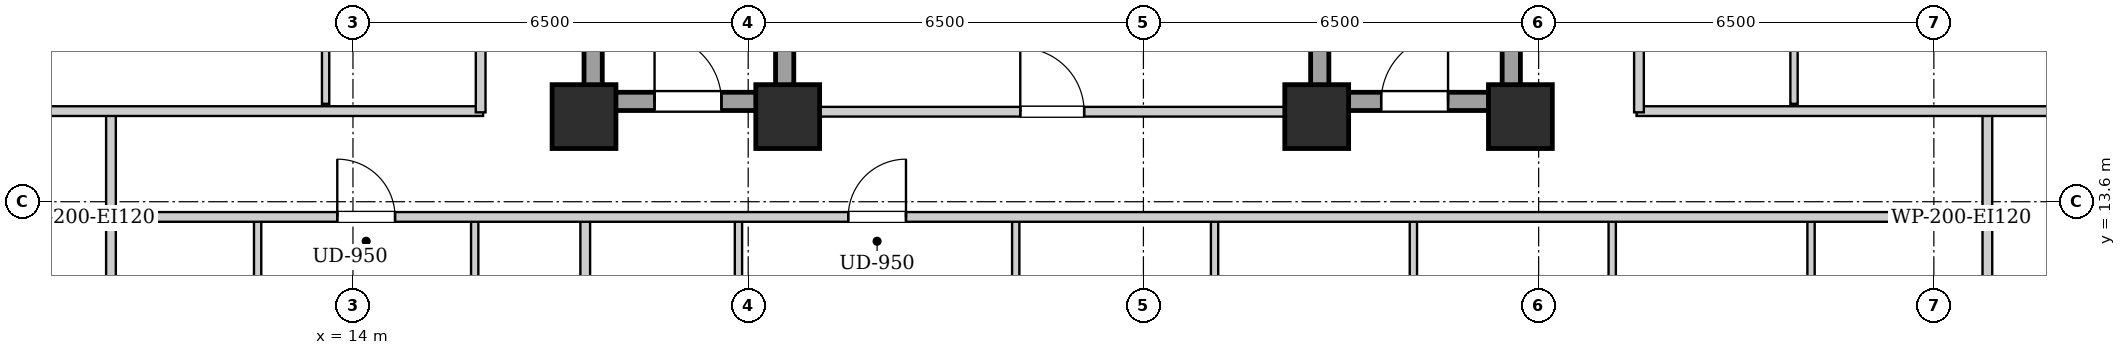
"""IFC4 building model, lengths in metres.
Left out: names, types, materials, properties, quantities, classifications, styles, units other than length and angle.
Written with IfcOpenShell. Run it as: python <this file> out.ifc"""

import sys

from ifc_helpers import new_model, si_unit, direction, frame, frame_2d, origin, origin_2d, place, context, subcontext, project, spatial, rectangle, extrude, element, fill, save


model = new_model("IFC4")
c1 = context("Model", 3, precision=1e-05, world=origin(), true_north=direction((0.0, 1.0)))
c2 = subcontext(c1, "Body", "Model", "MODEL_VIEW")
j1 = project(units=[si_unit("LENGTHUNIT", "METRE"), si_unit("PLANEANGLEUNIT", "RADIAN")], contexts=[c1])
p1 = place(None, origin())
s1 = spatial("IfcSite", under=j1, at=p1, CompositionType="ELEMENT")
p2 = place(p1, origin())
s2 = spatial("IfcBuilding", under=s1, at=p2, CompositionType="ELEMENT")
p3 = place(p2, frame((0.0, 0.0, 116.7)))
s3 = spatial("IfcBuildingStorey", under=s2, at=p3, CompositionType="ELEMENT", Elevation=116.7)
for number, where, z_axis, x_axis in (
    (1, (17.8, 15.0, 0.0), (0.0, 0.0, 1.0), (1.0, 0.0, 0.0)),
    (2, (21.15, 15.0, 0.0), (0.0, 0.0, 1.0), (1.0, 0.0, 0.0)),
    (3, (29.85, 15.0, 0.0), (0.0, 0.0, 1.0), (1.0, 0.0, 0.0)),
    (4, (33.2, 15.0, 0.0), (0.0, 0.0, 1.0), (1.0, 0.0, 0.0)),
):
    element("IfcColumn", number, at=place(p3, frame(where, z_axis=z_axis, x_axis=x_axis)), inside=s3, PredefinedType="COLUMN", context=c2, shape_type="SweptSolid", body=[
        extrude(rectangle(XDim=1.05, YDim=1.05, at=origin_2d()), origin(), (0.0, 0.0, 1.0), 3.2),
    ])
for number, where, z_axis, x_axis in (
    (5, (17.95, 15.1, 0.0), (0.0, 0.0, 1.0), (0.0, 1.0, 0.0)),
    (6, (21.1, 15.1, 0.0), (0.0, 0.0, 1.0), (0.0, 1.0, 0.0)),
):
    element("IfcWall", number, at=place(p3, frame(where, z_axis=z_axis, x_axis=x_axis)), inside=s3, PredefinedType="SHEAR", context=c2, shape_type="SweptSolid", body=[
        extrude(rectangle(XDim=9.0, YDim=0.3, at=frame_2d((4.5, 0.0))), origin(), (0.0, 0.0, 1.0), 2.88),
    ])
p4 = place(p3, frame((18.1, 15.25, 0.0), z_axis=(0.0, 0.0, 1.0), x_axis=(1.0, 0.0, 0.0)))
e7 = element("IfcWall", 7, at=p4, inside=s3, PredefinedType="SHEAR", context=c2, shape_type="SweptSolid", body=[
    extrude(rectangle(XDim=2.85, YDim=0.3, at=frame_2d((1.425, 0.0))), origin(), (0.0, 0.0, 1.0), 2.88),
])
p5 = place(p4, frame((0.86, 0.0, 0.0)))
e8 = element("IfcOpeningElement", 8, at=p5, cuts=e7, PredefinedType="OPENING", context=c2, shape_type="SweptSolid", body=[
    extrude(rectangle(XDim=1.1, YDim=2.05, at=frame_2d((0.55, 1.025))), frame((0.0, 0.16, 0.0), z_axis=(0.0, -1.0, 0.0), x_axis=(1.0, 0.0, 0.0)), (0.0, 0.0, 1.0), 0.32),
])
for number, where, z_axis, x_axis in (
    (9, (29.9, 15.1, 0.0), (0.0, 0.0, 1.0), (0.0, 1.0, 0.0)),
    (10, (33.05, 15.1, 0.0), (0.0, 0.0, 1.0), (0.0, 1.0, 0.0)),
):
    element("IfcWall", number, at=place(p3, frame(where, z_axis=z_axis, x_axis=x_axis)), inside=s3, PredefinedType="SHEAR", context=c2, shape_type="SweptSolid", body=[
        extrude(rectangle(XDim=9.0, YDim=0.3, at=frame_2d((4.5, 0.0))), origin(), (0.0, 0.0, 1.0), 2.88),
    ])
p6 = place(p3, frame((30.05, 15.25, 0.0), z_axis=(0.0, 0.0, 1.0), x_axis=(1.0, 0.0, 0.0)))
e11 = element("IfcWall", 11, at=p6, inside=s3, PredefinedType="SHEAR", context=c2, shape_type="SweptSolid", body=[
    extrude(rectangle(XDim=2.85, YDim=0.3, at=frame_2d((1.425, 0.0))), origin(), (0.0, 0.0, 1.0), 2.88),
])
p7 = place(p6, frame((0.86, 0.0, 0.0)))
e12 = element("IfcOpeningElement", 12, at=p7, cuts=e11, PredefinedType="OPENING", context=c2, shape_type="SweptSolid", body=[
    extrude(rectangle(XDim=1.1, YDim=2.05, at=frame_2d((0.55, 1.025))), frame((0.0, 0.16, 0.0), z_axis=(0.0, -1.0, 0.0), x_axis=(1.0, 0.0, 0.0)), (0.0, 0.0, 1.0), 0.32),
])
p8 = place(p3, frame((21.25, 15.08, 0.0), z_axis=(0.0, 0.0, 1.0), x_axis=(1.0, 0.0, 0.0)))
e13 = element("IfcWall", 13, at=p8, inside=s3, PredefinedType="PARTITIONING", context=c2, shape_type="SweptSolid", body=[
    extrude(rectangle(XDim=8.5, YDim=0.16, at=frame_2d((4.25, 0.0))), origin(), (0.0, 0.0, 1.0), 2.253),
])
p9 = place(p8, frame((3.725, 0.0, 0.0)))
e14 = element("IfcOpeningElement", 14, at=p9, cuts=e13, PredefinedType="OPENING", context=c2, shape_type="SweptSolid", body=[
    extrude(rectangle(XDim=1.05, YDim=2.05, at=frame_2d((0.525, 1.025))), frame((0.0, 0.09, 0.0), z_axis=(0.0, -1.0, 0.0), x_axis=(1.0, 0.0, 0.0)), (0.0, 0.0, 1.0), 0.18),
])
for number, where, z_axis, x_axis in (
    (15, (10.02, 13.35, 0.0), (0.0, 0.0, 1.0), (0.0, 1.0, 0.0)),
    (16, (40.88, 13.35, 0.0), (0.0, 0.0, 1.0), (0.0, 1.0, 0.0)),
):
    element("IfcWall", number, at=place(p3, frame(where, z_axis=z_axis, x_axis=x_axis)), inside=s3, PredefinedType="PARTITIONING", context=c2, shape_type="SweptSolid", body=[
        extrude(rectangle(XDim=1.74, YDim=0.16, at=frame_2d((0.87, 0.0))), origin(), (0.0, 0.0, 1.0), 2.88),
    ])
p10 = place(p3, frame((7.78, 15.09, 0.0), z_axis=(0.0, 0.0, 1.0), x_axis=(1.0, 0.0, 0.0)))
e17 = element("IfcWall", 17, at=p10, inside=s3, PredefinedType="PARTITIONING", context=c2, shape_type="SweptSolid", body=[
    extrude(rectangle(XDim=8.36, YDim=0.16, at=frame_2d((4.18, 0.0))), origin(), (0.0, 0.0, 1.0), 2.253),
])
p11 = place(p3, frame((35.11, 15.09, 0.0), z_axis=(0.0, 0.0, 1.0), x_axis=(1.0, 0.0, 0.0)))
e18 = element("IfcWall", 18, at=p11, inside=s3, PredefinedType="PARTITIONING", context=c2, shape_type="SweptSolid", body=[
    extrude(rectangle(XDim=8.01, YDim=0.16, at=frame_2d((4.005, 0.0))), origin(), (0.0, 0.0, 1.0), 2.253),
])
p12 = place(p3, frame((10.02, 10.4, 0.0), z_axis=(0.0, 0.0, 1.0), x_axis=(0.0, 1.0, 0.0)))
e19 = element("IfcWall", 19, at=p12, inside=s3, PredefinedType="PARTITIONING", context=c2, shape_type="SweptSolid", body=[
    extrude(rectangle(XDim=2.91, YDim=0.16, at=frame_2d((1.455, 0.0))), origin(), (0.0, 0.0, 1.0), 2.88),
])
p13 = place(p3, frame((12.432, 10.46, 0.0), z_axis=(0.0, 0.0, 1.0), x_axis=(0.0, 1.0, 0.0)))
e20 = element("IfcWall", 20, at=p13, inside=s3, PredefinedType="PARTITIONING", context=c2, shape_type="SweptSolid", body=[
    extrude(rectangle(XDim=2.85, YDim=0.12, at=frame_2d((1.425, 0.0))), origin(), (0.0, 0.0, 1.0), 2.88),
])
p14 = place(p13, frame((0.995, 0.0, 0.0)))
e21 = element("IfcOpeningElement", 21, at=p14, cuts=e20, PredefinedType="OPENING", context=c2, shape_type="SweptSolid", body=[
    extrude(rectangle(XDim=0.86, YDim=2.05, at=frame_2d((0.43, 1.025))), frame((0.0, 0.07, 0.0), z_axis=(0.0, -1.0, 0.0), x_axis=(1.0, 0.0, 0.0)), (0.0, 0.0, 1.0), 0.14),
])
p15 = place(p3, frame((16.002, 10.46, 0.0), z_axis=(0.0, 0.0, 1.0), x_axis=(0.0, 1.0, 0.0)))
e22 = element("IfcWall", 22, at=p15, inside=s3, PredefinedType="PARTITIONING", context=c2, shape_type="SweptSolid", body=[
    extrude(rectangle(XDim=2.85, YDim=0.12, at=frame_2d((1.425, 0.0))), origin(), (0.0, 0.0, 1.0), 2.88),
])
p16 = place(p15, frame((0.975, 0.0, 0.0)))
e23 = element("IfcOpeningElement", 23, at=p16, cuts=e22, PredefinedType="OPENING", context=c2, shape_type="SweptSolid", body=[
    extrude(rectangle(XDim=0.9, YDim=2.05, at=frame_2d((0.45, 1.025))), frame((0.0, 0.07, 0.0), z_axis=(0.0, -1.0, 0.0), x_axis=(1.0, 0.0, 0.0)), (0.0, 0.0, 1.0), 0.14),
])
p17 = place(p3, frame((40.88, 10.4, 0.0), z_axis=(0.0, 0.0, 1.0), x_axis=(0.0, 1.0, 0.0)))
e24 = element("IfcWall", 24, at=p17, inside=s3, PredefinedType="PARTITIONING", context=c2, shape_type="SweptSolid", body=[
    extrude(rectangle(XDim=2.91, YDim=0.16, at=frame_2d((1.455, 0.0))), origin(), (0.0, 0.0, 1.0), 2.88),
])
p18 = place(p3, frame((17.82, 2.26, 0.0), z_axis=(0.0, 0.0, 1.0), x_axis=(0.0, 1.0, 0.0)))
e25 = element("IfcWall", 25, at=p18, inside=s3, PredefinedType="PARTITIONING", context=c2, shape_type="SweptSolid", body=[
    extrude(rectangle(XDim=11.05, YDim=0.16, at=frame_2d((5.525, 0.0))), origin(), (0.0, 0.0, 1.0), 2.253),
])
p19 = place(p3, frame((20.34, 10.46, 0.0), z_axis=(0.0, 0.0, 1.0), x_axis=(0.0, 1.0, 0.0)))
e26 = element("IfcWall", 26, at=p19, inside=s3, PredefinedType="PARTITIONING", context=c2, shape_type="SweptSolid", body=[
    extrude(rectangle(XDim=2.85, YDim=0.12, at=frame_2d((1.425, 0.0))), origin(), (0.0, 0.0, 1.0), 2.88),
])
p20 = place(p19, frame((0.995, 0.0, 0.0)))
e27 = element("IfcOpeningElement", 27, at=p20, cuts=e26, PredefinedType="OPENING", context=c2, shape_type="SweptSolid", body=[
    extrude(rectangle(XDim=0.86, YDim=2.05, at=frame_2d((0.43, 1.025))), frame((0.0, 0.07, 0.0), z_axis=(0.0, -1.0, 0.0), x_axis=(1.0, 0.0, 0.0)), (0.0, 0.0, 1.0), 0.14),
])
p21 = place(p3, frame((24.9, 10.46, 0.0), z_axis=(0.0, 0.0, 1.0), x_axis=(0.0, 1.0, 0.0)))
e28 = element("IfcWall", 28, at=p21, inside=s3, PredefinedType="PARTITIONING", context=c2, shape_type="SweptSolid", body=[
    extrude(rectangle(XDim=2.85, YDim=0.12, at=frame_2d((1.425, 0.0))), origin(), (0.0, 0.0, 1.0), 2.88),
])
p22 = place(p21, frame((0.975, 0.0, 0.0)))
e29 = element("IfcOpeningElement", 29, at=p22, cuts=e28, PredefinedType="OPENING", context=c2, shape_type="SweptSolid", body=[
    extrude(rectangle(XDim=0.9, YDim=2.05, at=frame_2d((0.45, 1.025))), frame((0.0, 0.07, 0.0), z_axis=(0.0, -1.0, 0.0), x_axis=(1.0, 0.0, 0.0)), (0.0, 0.0, 1.0), 0.14),
])
p23 = place(p3, frame((28.17, 10.46, 0.0), z_axis=(0.0, 0.0, 1.0), x_axis=(0.0, 1.0, 0.0)))
e30 = element("IfcWall", 30, at=p23, inside=s3, PredefinedType="PARTITIONING", context=c2, shape_type="SweptSolid", body=[
    extrude(rectangle(XDim=2.85, YDim=0.12, at=frame_2d((1.425, 0.0))), origin(), (0.0, 0.0, 1.0), 2.88),
])
p24 = place(p23, frame((0.975, 0.0, 0.0)))
e31 = element("IfcOpeningElement", 31, at=p24, cuts=e30, PredefinedType="OPENING", context=c2, shape_type="SweptSolid", body=[
    extrude(rectangle(XDim=0.9, YDim=2.05, at=frame_2d((0.45, 1.025))), frame((0.0, 0.07, 0.0), z_axis=(0.0, -1.0, 0.0), x_axis=(1.0, 0.0, 0.0)), (0.0, 0.0, 1.0), 0.14),
])
p25 = place(p3, frame((31.44, 10.46, 0.0), z_axis=(0.0, 0.0, 1.0), x_axis=(0.0, 1.0, 0.0)))
e32 = element("IfcWall", 32, at=p25, inside=s3, PredefinedType="PARTITIONING", context=c2, shape_type="SweptSolid", body=[
    extrude(rectangle(XDim=2.85, YDim=0.12, at=frame_2d((1.425, 0.0))), origin(), (0.0, 0.0, 1.0), 2.88),
])
p26 = place(p25, frame((0.975, 0.0, 0.0)))
e33 = element("IfcOpeningElement", 33, at=p26, cuts=e32, PredefinedType="OPENING", context=c2, shape_type="SweptSolid", body=[
    extrude(rectangle(XDim=0.9, YDim=2.05, at=frame_2d((0.45, 1.025))), frame((0.0, 0.07, 0.0), z_axis=(0.0, -1.0, 0.0), x_axis=(1.0, 0.0, 0.0)), (0.0, 0.0, 1.0), 0.14),
])
p27 = place(p3, frame((34.71, 10.46, 0.0), z_axis=(0.0, 0.0, 1.0), x_axis=(0.0, 1.0, 0.0)))
e34 = element("IfcWall", 34, at=p27, inside=s3, PredefinedType="PARTITIONING", context=c2, shape_type="SweptSolid", body=[
    extrude(rectangle(XDim=2.85, YDim=0.12, at=frame_2d((1.425, 0.0))), origin(), (0.0, 0.0, 1.0), 2.88),
])
p28 = place(p27, frame((0.975, 0.0, 0.0)))
e35 = element("IfcOpeningElement", 35, at=p28, cuts=e34, PredefinedType="OPENING", context=c2, shape_type="SweptSolid", body=[
    extrude(rectangle(XDim=0.9, YDim=2.05, at=frame_2d((0.45, 1.025))), frame((0.0, 0.07, 0.0), z_axis=(0.0, -1.0, 0.0), x_axis=(1.0, 0.0, 0.0)), (0.0, 0.0, 1.0), 0.14),
])
p29 = place(p3, frame((37.98, 10.46, 0.0), z_axis=(0.0, 0.0, 1.0), x_axis=(0.0, 1.0, 0.0)))
e36 = element("IfcWall", 36, at=p29, inside=s3, PredefinedType="PARTITIONING", context=c2, shape_type="SweptSolid", body=[
    extrude(rectangle(XDim=2.85, YDim=0.12, at=frame_2d((1.425, 0.0))), origin(), (0.0, 0.0, 1.0), 2.88),
])
p30 = place(p29, frame((0.975, 0.0, 0.0)))
e37 = element("IfcOpeningElement", 37, at=p30, cuts=e36, PredefinedType="OPENING", context=c2, shape_type="SweptSolid", body=[
    extrude(rectangle(XDim=0.9, YDim=2.05, at=frame_2d((0.45, 1.025))), frame((0.0, 0.07, 0.0), z_axis=(0.0, -1.0, 0.0), x_axis=(1.0, 0.0, 0.0)), (0.0, 0.0, 1.0), 0.14),
])
for number, where, z_axis, x_axis in (
    (38, (13.55, 15.21, 0.0), (0.0, 0.0, 1.0), (0.0, 1.0, 0.0)),
    (39, (37.7, 15.21, 0.0), (0.0, 0.0, 1.0), (0.0, 1.0, 0.0)),
):
    element("IfcWall", number, at=place(p3, frame(where, z_axis=z_axis, x_axis=x_axis)), inside=s3, PredefinedType="PARTITIONING", context=c2, shape_type="SweptSolid", body=[
        extrude(rectangle(XDim=2.159, YDim=0.12, at=frame_2d((1.08, 0.0))), origin(), (0.0, 0.0, 1.0), 2.88),
    ])
p31 = place(p3, frame((10.05, 13.35, 0.0), z_axis=(0.0, 0.0, 1.0), x_axis=(1.0, 0.0, 0.0)))
e40 = element("IfcWall", 40, at=p31, inside=s3, PredefinedType="PARTITIONING", context=c2, shape_type="SweptSolid", body=[
    extrude(rectangle(XDim=30.8, YDim=0.16, at=frame_2d((15.4, 0.0))), origin(), (0.0, 0.0, 1.0), 2.88),
])
p32 = place(p31, frame((3.692, 0.0, 0.0)))
e41 = element("IfcOpeningElement", 41, at=p32, cuts=e40, PredefinedType="OPENING", context=c2, shape_type="SweptSolid", body=[
    extrude(rectangle(XDim=0.95, YDim=2.1, at=frame_2d((0.475, 1.05))), frame((0.0, 0.09, 0.0), z_axis=(0.0, -1.0, 0.0), x_axis=(1.0, 0.0, 0.0)), (0.0, 0.0, 1.0), 0.18),
])
p33 = place(p31, frame((12.095, 0.0, 0.0)))
e42 = element("IfcOpeningElement", 42, at=p33, cuts=e40, PredefinedType="OPENING", context=c2, shape_type="SweptSolid", body=[
    extrude(rectangle(XDim=0.95, YDim=2.1, at=frame_2d((0.475, 1.05))), frame((0.0, 0.09, 0.0), z_axis=(0.0, -1.0, 0.0), x_axis=(1.0, 0.0, 0.0)), (0.0, 0.0, 1.0), 0.18),
])
p34 = place(p3, frame((16.1, 15.07, 0.0), z_axis=(0.0, 0.0, 1.0), x_axis=(0.0, 1.0, 0.0)))
e43 = element("IfcWall", 43, at=p34, inside=s3, PredefinedType="PARTITIONING", context=c2, shape_type="SweptSolid", body=[
    extrude(rectangle(XDim=13.93, YDim=0.16, at=frame_2d((6.965, 0.0))), origin(), (0.0, 0.0, 1.0), 2.88),
])
p35 = place(p34, frame((4.661, 0.0, 0.0)))
e44 = element("IfcOpeningElement", 44, at=p35, cuts=e43, PredefinedType="OPENING", context=c2, shape_type="SweptSolid", body=[
    extrude(rectangle(XDim=0.95, YDim=2.1, at=frame_2d((0.475, 1.05))), frame((0.0, 0.09, 0.0), z_axis=(0.0, -1.0, 0.0), x_axis=(1.0, 0.0, 0.0)), (0.0, 0.0, 1.0), 0.18),
])
p36 = place(p34, frame((11.411, 0.0, 0.0)))
e45 = element("IfcOpeningElement", 45, at=p36, cuts=e43, PredefinedType="OPENING", context=c2, shape_type="SweptSolid", body=[
    extrude(rectangle(XDim=0.95, YDim=2.1, at=frame_2d((0.475, 1.05))), frame((0.0, 0.09, 0.0), z_axis=(0.0, -1.0, 0.0), x_axis=(1.0, 0.0, 0.0)), (0.0, 0.0, 1.0), 0.18),
])
p37 = place(p3, frame((35.15, 15.07, 0.0), z_axis=(0.0, 0.0, 1.0), x_axis=(0.0, 1.0, 0.0)))
e46 = element("IfcWall", 46, at=p37, inside=s3, PredefinedType="PARTITIONING", context=c2, shape_type="SweptSolid", body=[
    extrude(rectangle(XDim=13.93, YDim=0.16, at=frame_2d((6.965, 0.0))), origin(), (0.0, 0.0, 1.0), 2.88),
])
p38 = place(p37, frame((4.661, 0.0, 0.0)))
e47 = element("IfcOpeningElement", 47, at=p38, cuts=e46, PredefinedType="OPENING", context=c2, shape_type="SweptSolid", body=[
    extrude(rectangle(XDim=0.95, YDim=2.1, at=frame_2d((0.475, 1.05))), frame((0.0, 0.09, 0.0), z_axis=(0.0, -1.0, 0.0), x_axis=(1.0, 0.0, 0.0)), (0.0, 0.0, 1.0), 0.18),
])
p39 = place(p37, frame((11.411, 0.0, 0.0)))
e48 = element("IfcOpeningElement", 48, at=p39, cuts=e46, PredefinedType="OPENING", context=c2, shape_type="SweptSolid", body=[
    extrude(rectangle(XDim=0.95, YDim=2.1, at=frame_2d((0.475, 1.05))), frame((0.0, 0.09, 0.0), z_axis=(0.0, -1.0, 0.0), x_axis=(1.0, 0.0, 0.0)), (0.0, 0.0, 1.0), 0.18),
])
p40 = place(p5, origin())
e49 = element("IfcDoor", 49, at=p40, inside=s3, OperationType="SINGLE_SWING_LEFT", PredefinedType="DOOR", context=c2, shape_type="SweptSolid", body=[
    extrude(rectangle(XDim=1.1, YDim=2.05, at=frame_2d((0.55, 1.025))), frame((0.0, 0.025, 0.0), z_axis=(0.0, -1.0, 0.0), x_axis=(1.0, 0.0, 0.0)), (0.0, 0.0, 1.0), 0.05),
])
fill(e8, e49)
p41 = place(p7, origin())
e50 = element("IfcDoor", 50, at=p41, inside=s3, OperationType="SINGLE_SWING_RIGHT", PredefinedType="DOOR", context=c2, shape_type="SweptSolid", body=[
    extrude(rectangle(XDim=1.1, YDim=2.05, at=frame_2d((0.55, 1.025))), frame((0.0, 0.025, 0.0), z_axis=(0.0, -1.0, 0.0), x_axis=(1.0, 0.0, 0.0)), (0.0, 0.0, 1.0), 0.05),
])
fill(e12, e50)
p42 = place(p9, origin())
e51 = element("IfcDoor", 51, at=p42, inside=s3, OperationType="SINGLE_SWING_LEFT", PredefinedType="DOOR", context=c2, shape_type="SweptSolid", body=[
    extrude(rectangle(XDim=1.05, YDim=2.05, at=frame_2d((0.525, 1.025))), frame((0.0, 0.025, 0.0), z_axis=(0.0, -1.0, 0.0), x_axis=(1.0, 0.0, 0.0)), (0.0, 0.0, 1.0), 0.05),
])
fill(e14, e51)
p43 = place(p32, origin())
e52 = element("IfcDoor", 52, at=p43, inside=s3, OperationType="SINGLE_SWING_LEFT", PredefinedType="DOOR", context=c2, shape_type="SweptSolid", body=[
    extrude(rectangle(XDim=0.95, YDim=2.1, at=frame_2d((0.475, 1.05))), frame((0.0, 0.025, 0.0), z_axis=(0.0, -1.0, 0.0), x_axis=(1.0, 0.0, 0.0)), (0.0, 0.0, 1.0), 0.05),
])
fill(e41, e52)
p44 = place(p33, origin())
e53 = element("IfcDoor", 53, at=p44, inside=s3, OperationType="SINGLE_SWING_RIGHT", PredefinedType="DOOR", context=c2, shape_type="SweptSolid", body=[
    extrude(rectangle(XDim=0.95, YDim=2.1, at=frame_2d((0.475, 1.05))), frame((0.0, 0.025, 0.0), z_axis=(0.0, -1.0, 0.0), x_axis=(1.0, 0.0, 0.0)), (0.0, 0.0, 1.0), 0.05),
])
fill(e42, e53)
save(model, sys.argv[1])
